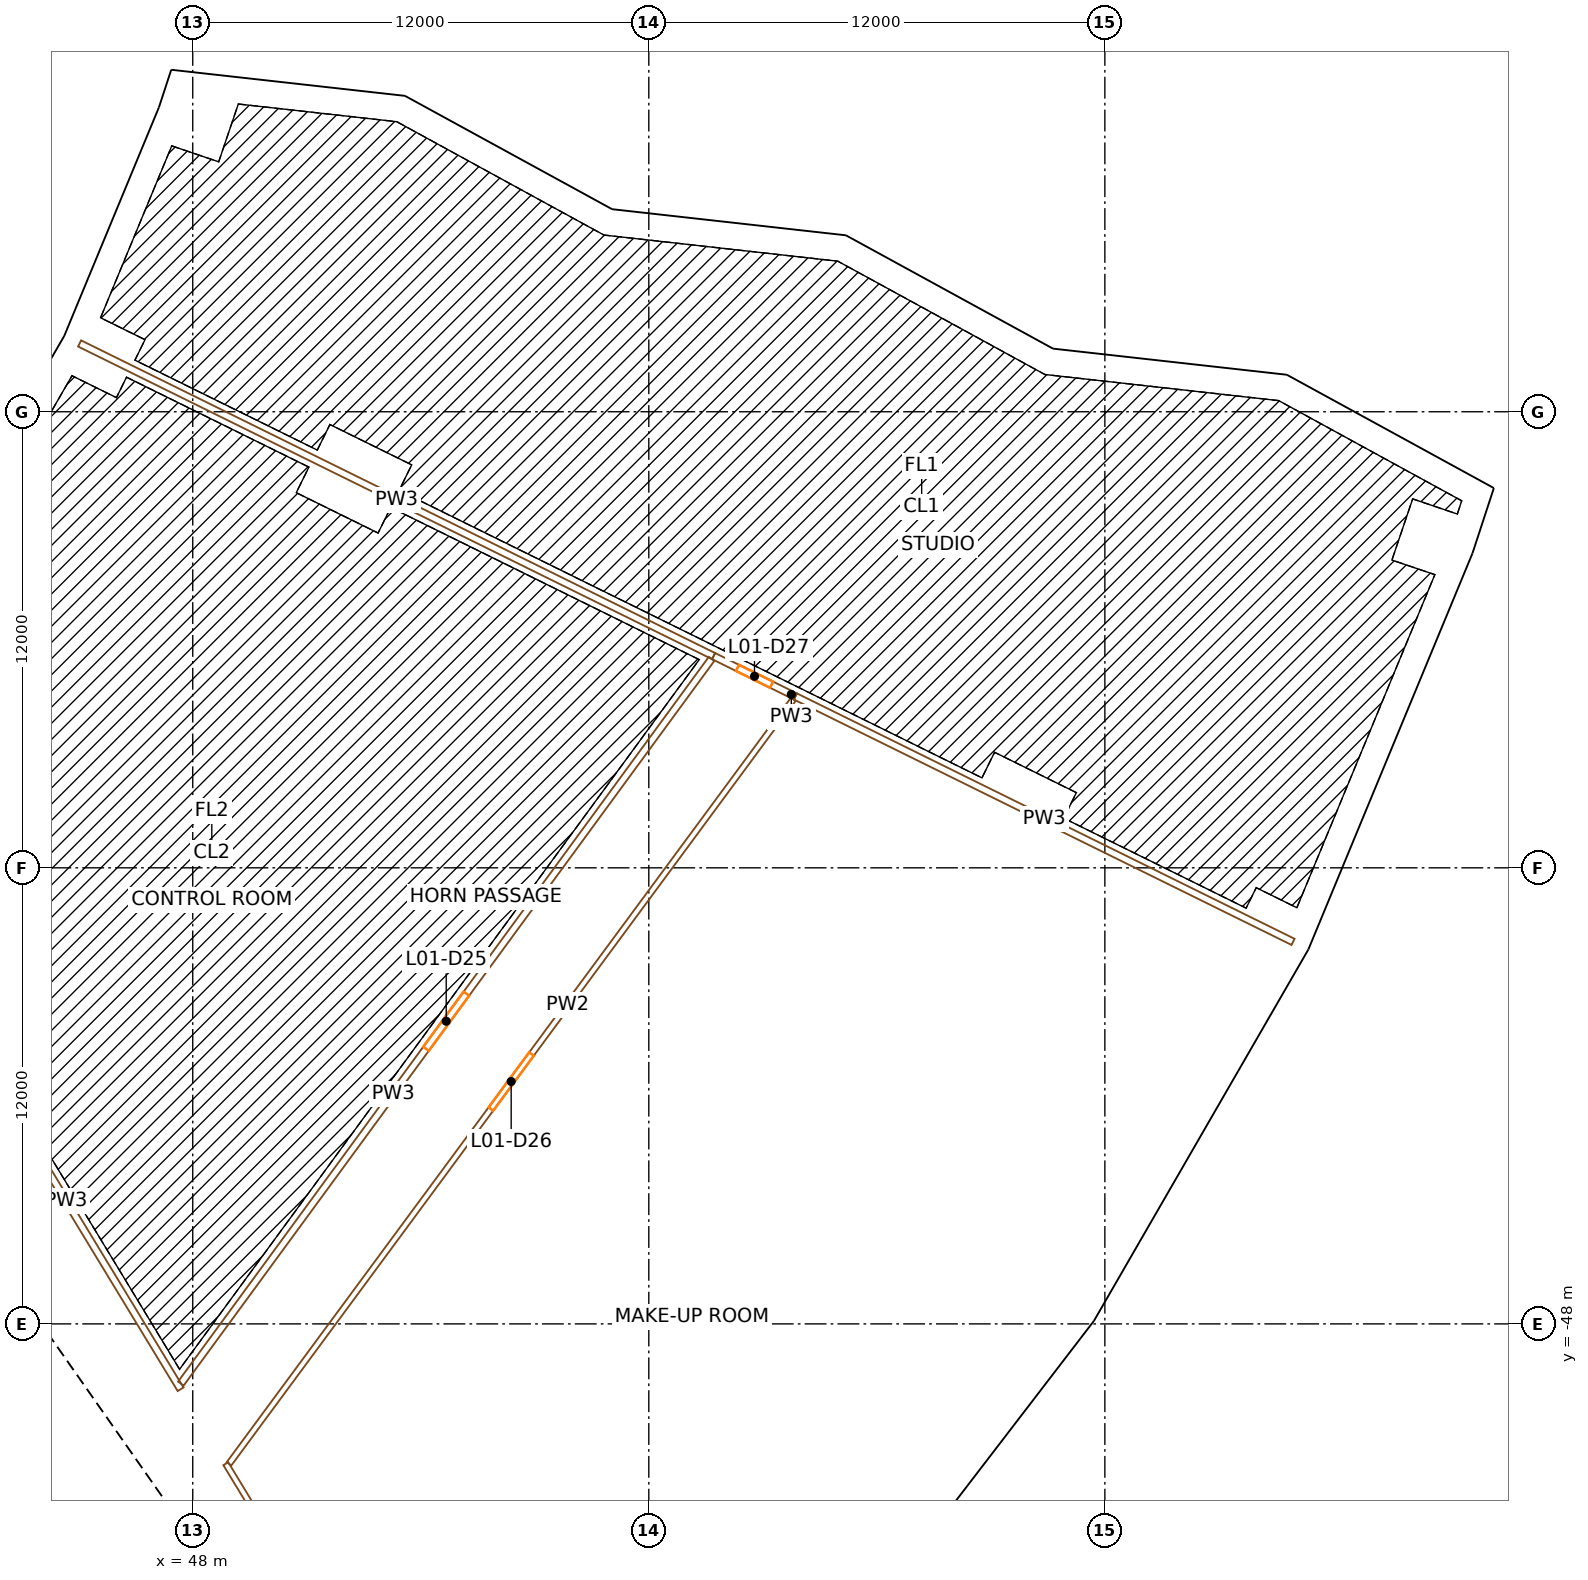
"""IFC4 building model, lengths in metres.
Left out: names, types, materials, properties, quantities, classifications, styles, units other than length and angle.
Written with IfcOpenShell. Run it as: python <this file> out.ifc"""

import sys

from ifc_helpers import new_model, si_unit, direction, frame, frame_2d, origin, origin_2d, place, context, subcontext, project, spatial, rectangle, extrude, element, fill, save


model = new_model("IFC4")
c1 = context("Model", 3, precision=1e-05, world=origin(), true_north=direction((0.0, 1.0)))
c2 = subcontext(c1, "Body", "Model", "MODEL_VIEW")
j1 = project(units=[si_unit("LENGTHUNIT", "METRE"), si_unit("PLANEANGLEUNIT", "RADIAN")], contexts=[c1])
p1 = place(None, origin())
s1 = spatial("IfcSite", under=j1, at=p1, CompositionType="ELEMENT")
p2 = place(p1, origin())
s2 = spatial("IfcBuilding", under=s1, at=p2, CompositionType="ELEMENT")
p3 = place(p2, frame((0.0, 0.0, 9.0)))
s3 = spatial("IfcBuildingStorey", under=s2, at=p3, CompositionType="ELEMENT", Elevation=9.0)
for number, where, z_axis, x_axis in (
    (1, (43.795, -38.407, 0.0), (0.0, 0.0, 1.0), (0.659, 0.752, 0.0)),
    (2, (58.456, -51.264, 0.0), (0.0, 0.0, 1.0), (0.659, 0.752, 0.0)),
    (3, (48.433, -32.362, 0.0), (0.0, 0.0, 1.0), (0.556, 0.831, 0.0)),
    (4, (64.647, -43.196, 0.0), (0.0, 0.0, 1.0), (0.556, 0.831, 0.0)),
):
    element("IfcColumn", number, at=place(p3, frame(where, z_axis=z_axis, x_axis=x_axis)), inside=s3, PredefinedType="COLUMN", context=c2, shape_type="SweptSolid", body=[
        extrude(rectangle(XDim=1.4, YDim=1.8, at=origin_2d()), origin(), (0.0, 0.0, 1.0), 9.0),
    ])
for number, where, z_axis, x_axis in (
    (5, (70.883, -47.362, 0.0), (0.0, 0.0, 1.0), (0.556, 0.831, 0.0)),
    (6, (45.516, -22.446, 0.0), (0.0, 0.0, 1.0), (0.442, 0.897, 0.0)),
):
    element("IfcColumn", number, at=place(p3, frame(where, z_axis=z_axis, x_axis=x_axis)), inside=s3, PredefinedType="COLUMN", context=c2, shape_type="SweptSolid", body=[
        extrude(rectangle(XDim=1.1, YDim=1.3, at=origin_2d()), origin(), (0.0, 0.0, 1.0), 9.0),
    ])
for number, where, z_axis, x_axis in (
    (7, (52.243, -25.763, 0.0), (0.0, 0.0, 1.0), (0.442, 0.897, 0.0)),
    (8, (69.732, -34.388, 0.0), (0.0, 0.0, 1.0), (0.442, 0.897, 0.0)),
):
    element("IfcColumn", number, at=place(p3, frame(where, z_axis=z_axis, x_axis=x_axis)), inside=s3, PredefinedType="COLUMN", context=c2, shape_type="SweptSolid", body=[
        extrude(rectangle(XDim=1.4, YDim=1.8, at=origin_2d()), origin(), (0.0, 0.0, 1.0), 9.0),
    ])
for number, where, z_axis, x_axis in (
    (9, (76.458, -37.705, 0.0), (0.0, 0.0, 1.0), (0.442, 0.897, 0.0)),
    (10, (48.057, -16.313, 0.0), (0.0, 0.0, 1.0), (0.321, 0.947, 0.0)),
):
    element("IfcColumn", number, at=place(p3, frame(where, z_axis=z_axis, x_axis=x_axis)), inside=s3, PredefinedType="COLUMN", context=c2, shape_type="SweptSolid", body=[
        extrude(rectangle(XDim=1.1, YDim=1.3, at=origin_2d()), origin(), (0.0, 0.0, 1.0), 9.0),
    ])
for number, where, z_axis, x_axis in (
    (11, (55.159, -18.724, 0.0), (0.0, 0.0, 1.0), (0.321, 0.947, 0.0)),
    (12, (73.624, -24.992, 0.0), (0.0, 0.0, 1.0), (0.321, 0.947, 0.0)),
):
    element("IfcColumn", number, at=place(p3, frame(where, z_axis=z_axis, x_axis=x_axis)), inside=s3, PredefinedType="COLUMN", context=c2, shape_type="SweptSolid", body=[
        extrude(rectangle(XDim=1.4, YDim=1.8, at=origin_2d()), origin(), (0.0, 0.0, 1.0), 9.0),
    ])
p4 = place(p3, frame((80.726, -27.403, 0.0), z_axis=(0.0, 0.0, 1.0), x_axis=(0.321439465303, 0.946930129495, 0.0)))
e13 = element("IfcColumn", 13, at=p4, inside=s3, PredefinedType="COLUMN", context=c2, shape_type="SweptSolid", body=[
    extrude(rectangle(XDim=1.1, YDim=1.3, at=origin_2d()), origin(), (0.0, 0.0, 1.0), 9.0),
])
p5 = place(p3, frame((49.779, -57.191, 0.0), z_axis=(0.0, 0.0, 1.0), x_axis=(-0.573577477574, 0.819151315216, 0.0)))
e14 = element("IfcWall", 14, at=p5, inside=s3, PredefinedType="SHEAR", context=c2, shape_type="SweptSolid", body=[
    extrude(rectangle(XDim=14.8, YDim=0.9, at=frame_2d((7.4, 0.0))), origin(), (0.0, 0.0, 1.0), 8.6),
])
p6 = place(p5, frame((6.7, 0.0, 0.0)))
e15 = element("IfcOpeningElement", 15, at=p6, cuts=e14, PredefinedType="OPENING", context=c2, shape_type="SweptSolid", body=[
    extrude(rectangle(XDim=1.4, YDim=2.1, at=frame_2d((0.7, 1.05))), frame((0.0, 0.46, 0.0), z_axis=(0.0, -1.0, 0.0), x_axis=(1.0, 0.0, 0.0)), (0.0, 0.0, 1.0), 0.92),
])
p7 = place(p3, frame((81.734, -25.99, 0.0), z_axis=(0.0, 0.0, 1.0), x_axis=(-0.877209140108, 0.480108450781, 0.0)))
e16 = element("IfcWall", 16, at=p7, inside=s3, PredefinedType="SOLIDWALL", context=c2, shape_type="SweptSolid", body=[
    extrude(rectangle(XDim=5.553, YDim=0.45, at=frame_2d((2.776, 0.0))), origin(), (0.0, 0.0, 1.0), 7.7),
])
p8 = place(p3, frame((76.804, -23.255, 0.0), z_axis=(0.0, 0.0, 1.0), x_axis=(-0.993813805196, 0.111059086081, 0.0)))
e17 = element("IfcWall", 17, at=p8, inside=s3, PredefinedType="SOLIDWALL", context=c2, shape_type="SweptSolid", body=[
    extrude(rectangle(XDim=6.362, YDim=0.45, at=frame_2d((3.181, 0.0))), origin(), (0.0, 0.0, 1.0), 7.7),
])
p9 = place(p3, frame((70.422, -22.479, 0.0), z_axis=(0.0, 0.0, 1.0), x_axis=(-0.877230259454, 0.480069861477, 0.0)))
e18 = element("IfcWall", 18, at=p9, inside=s3, PredefinedType="SOLIDWALL", context=c2, shape_type="SweptSolid", body=[
    extrude(rectangle(XDim=5.884, YDim=0.45, at=frame_2d((2.942, 0.0))), origin(), (0.0, 0.0, 1.0), 7.7),
])
p10 = place(p3, frame((65.202, -19.585, 0.0), z_axis=(0.0, 0.0, 1.0), x_axis=(-0.993818963433, 0.111012917816, 0.0)))
e19 = element("IfcWall", 19, at=p10, inside=s3, PredefinedType="SOLIDWALL", context=c2, shape_type="SweptSolid", body=[
    extrude(rectangle(XDim=6.36, YDim=0.45, at=frame_2d((3.18, 0.0))), origin(), (0.0, 0.0, 1.0), 7.7),
])
p11 = place(p3, frame((58.822, -18.81, 0.0), z_axis=(0.0, 0.0, 1.0), x_axis=(-0.87728135657, 0.479976480064, 0.0)))
e20 = element("IfcWall", 20, at=p11, inside=s3, PredefinedType="SOLIDWALL", context=c2, shape_type="SweptSolid", body=[
    extrude(rectangle(XDim=5.885, YDim=0.45, at=frame_2d((2.943, 0.0))), origin(), (0.0, 0.0, 1.0), 7.7),
])
p12 = place(p3, frame((53.599, -15.916, 0.0), z_axis=(0.0, 0.0, 1.0), x_axis=(-0.993827533543, 0.110936168908, 0.0)))
e21 = element("IfcWall", 21, at=p12, inside=s3, PredefinedType="SOLIDWALL", context=c2, shape_type="SweptSolid", body=[
    extrude(rectangle(XDim=6.265, YDim=0.45, at=frame_2d((3.133, 0.0))), origin(), (0.0, 0.0, 1.0), 7.7),
])
p13 = place(p3, frame((44.792, -22.155, 0.0), z_axis=(0.0, 0.0, 1.0), x_axis=(-0.50000447882, -0.866022817921, 0.0)))
e22 = element("IfcWall", 22, at=p13, inside=s3, PredefinedType="SOLIDWALL", context=c2, shape_type="SweptSolid", body=[
    extrude(rectangle(XDim=6.419, YDim=0.45, at=frame_2d((3.21, 0.0))), origin(), (0.0, 0.0, 1.0), 7.7),
])
p14 = place(p3, frame((47.327, -16.056, 0.0), z_axis=(0.0, 0.0, 1.0), x_axis=(-0.382692796414, -0.92387565374, 0.0)))
e23 = element("IfcWall", 23, at=p14, inside=s3, PredefinedType="SOLIDWALL", context=c2, shape_type="SweptSolid", body=[
    extrude(rectangle(XDim=6.576, YDim=0.45, at=frame_2d((3.288, 0.0))), origin(), (0.0, 0.0, 1.0), 7.7),
])
p15 = place(p3, frame((47.509, -15.497, 0.0), z_axis=(0.0, 0.0, 1.0), x_axis=(-0.311474670585, -0.950254455177, 0.0)))
e24 = element("IfcWall", 24, at=p15, inside=s3, PredefinedType="SOLIDWALL", context=c2, shape_type="SweptSolid", body=[
    extrude(rectangle(XDim=0.571, YDim=0.45, at=frame_2d((0.285, 0.0))), origin(), (0.0, 0.0, 1.0), 7.7),
])
p16 = place(p3, frame((64.713, -56.673, 0.0), z_axis=(0.0, 0.0, 1.0), x_axis=(0.608758773695, 0.793355377778, 0.0)))
e25 = element("IfcWall", 25, at=p16, inside=s3, PredefinedType="SOLIDWALL", context=c2, shape_type="SweptSolid", body=[
    extrude(rectangle(XDim=11.135, YDim=0.45, at=frame_2d((5.567, 0.0))), origin(), (0.0, 0.0, 1.0), 7.7),
])
p17 = place(p3, frame((71.512, -47.819, 0.0), z_axis=(0.0, 0.0, 1.0), x_axis=(0.500001430823, 0.866024577697, 0.0)))
e26 = element("IfcWall", 26, at=p17, inside=s3, PredefinedType="SOLIDWALL", context=c2, shape_type="SweptSolid", body=[
    extrude(rectangle(XDim=11.312, YDim=0.45, at=frame_2d((5.656, 0.0))), origin(), (0.0, 0.0, 1.0), 7.7),
])
p18 = place(p3, frame((77.176, -37.993, 0.0), z_axis=(0.0, 0.0, 1.0), x_axis=(0.382700611107, 0.923872416656, 0.0)))
e27 = element("IfcWall", 27, at=p18, inside=s3, PredefinedType="SOLIDWALL", context=c2, shape_type="SweptSolid", body=[
    extrude(rectangle(XDim=11.168, YDim=0.45, at=frame_2d((5.584, 0.0))), origin(), (0.0, 0.0, 1.0), 7.7),
])
p19 = place(p3, frame((81.457, -27.66, 0.0), z_axis=(0.0, 0.0, 1.0), x_axis=(0.311621150825, 0.95020642934, 0.0)))
e28 = element("IfcWall", 28, at=p19, inside=s3, PredefinedType="SOLIDWALL", context=c2, shape_type="SweptSolid", body=[
    extrude(rectangle(XDim=1.846, YDim=0.45, at=frame_2d((0.923, 0.0))), origin(), (0.0, 0.0, 1.0), 7.7),
])
p20 = place(p3, frame((41.648, -39.789, 0.0), z_axis=(0.0, 0.0, 1.0), x_axis=(0.519150836569, -0.854682636357, 0.0)))
e29 = element("IfcWall", 29, at=p20, inside=s3, PredefinedType="PARTITIONING", context=c2, shape_type="SweptSolid", body=[
    extrude(rectangle(XDim=11.619, YDim=0.18, at=frame_2d((5.81, 0.0))), origin(), (0.0, 0.0, 1.0), 7.6),
])
p21 = place(p3, frame((47.687, -49.571, 0.0), z_axis=(0.0, 0.0, 1.0), x_axis=(0.590834674168, 0.806792654776, 0.0)))
e30 = element("IfcWall", 30, at=p21, inside=s3, PredefinedType="PARTITIONING", context=c2, shape_type="SweptSolid", body=[
    extrude(rectangle(XDim=23.635, YDim=0.18, at=frame_2d((11.818, 0.0))), origin(), (0.0, 0.0, 1.0), 7.6),
])
p22 = place(p21, frame((10.918, 0.0, 0.0)))
e31 = element("IfcOpeningElement", 31, at=p22, cuts=e30, PredefinedType="OPENING", context=c2, shape_type="SweptSolid", body=[
    extrude(rectangle(XDim=1.8, YDim=2.1, at=frame_2d((0.9, 1.05))), frame((0.0, 0.1, 0.0), z_axis=(0.0, -1.0, 0.0), x_axis=(1.0, 0.0, 0.0)), (0.0, 0.0, 1.0), 0.2),
])
p23 = place(p3, frame((48.87, -51.679, 0.0), z_axis=(0.0, 0.0, 1.0), x_axis=(0.519169312849, -0.854671413232, 0.0)))
e32 = element("IfcWall", 32, at=p23, inside=s3, PredefinedType="PARTITIONING", context=c2, shape_type="SweptSolid", body=[
    extrude(rectangle(XDim=7.831, YDim=0.15, at=frame_2d((3.915, 0.0))), origin(), (0.0, 0.0, 1.0), 7.6),
])
p24 = place(p3, frame((63.804, -31.563, 0.0), z_axis=(0.0, 0.0, 1.0), x_axis=(-0.593865237906, -0.804564527683, 0.0)))
e33 = element("IfcWall", 33, at=p24, inside=s3, PredefinedType="PARTITIONING", context=c2, shape_type="SweptSolid", body=[
    extrude(rectangle(XDim=25.006, YDim=0.15, at=frame_2d((12.503, 0.0))), origin(), (0.0, 0.0, 1.0), 7.6),
])
p25 = place(p24, frame((11.603, 0.0, 0.0)))
e34 = element("IfcOpeningElement", 34, at=p25, cuts=e33, PredefinedType="OPENING", context=c2, shape_type="SweptSolid", body=[
    extrude(rectangle(XDim=1.8, YDim=2.1, at=frame_2d((0.9, 1.05))), frame((0.0, 0.085, 0.0), z_axis=(0.0, -1.0, 0.0), x_axis=(1.0, 0.0, 0.0)), (0.0, 0.0, 1.0), 0.17),
])
p26 = place(p3, frame((61.705, -30.429, 0.0), z_axis=(0.0, 0.0, 1.0), x_axis=(-0.896873438268, 0.442287277377, 0.0)))
e35 = element("IfcWall", 35, at=p26, inside=s3, PredefinedType="PARTITIONING", context=c2, shape_type="SweptSolid", body=[
    extrude(rectangle(XDim=18.6, YDim=0.18, at=frame_2d((9.3, 0.0))), origin(), (0.0, 0.0, 1.0), 7.6),
])
p27 = place(p3, frame((61.705, -30.429, 0.0), z_axis=(0.0, 0.0, 1.0), x_axis=(0.896875292523, -0.442283517284, 0.0)))
e36 = element("IfcWall", 36, at=p27, inside=s3, PredefinedType="PARTITIONING", context=c2, shape_type="SweptSolid", body=[
    extrude(rectangle(XDim=2.4, YDim=0.18, at=frame_2d((1.2, 0.0))), origin(), (0.0, 0.0, 1.0), 7.6),
])
p28 = place(p27, frame((0.7, 0.0, 0.0)))
e37 = element("IfcOpeningElement", 37, at=p28, cuts=e36, PredefinedType="OPENING", context=c2, shape_type="SweptSolid", body=[
    extrude(rectangle(XDim=1.0, YDim=2.1, at=frame_2d((0.5, 1.05))), frame((0.0, 0.1, 0.0), z_axis=(0.0, -1.0, 0.0), x_axis=(1.0, 0.0, 0.0)), (0.0, 0.0, 1.0), 0.2),
])
p29 = place(p3, frame((76.952, -37.948, 0.0), z_axis=(0.0, 0.0, 1.0), x_axis=(-0.896868508028, 0.442297274813, 0.0)))
e38 = element("IfcWall", 38, at=p29, inside=s3, PredefinedType="PARTITIONING", context=c2, shape_type="SweptSolid", body=[
    extrude(rectangle(XDim=14.6, YDim=0.18, at=frame_2d((7.3, 0.0))), origin(), (0.0, 0.0, 1.0), 7.6),
])
p30 = place(p6, origin())
e39 = element("IfcDoor", 39, at=p30, inside=s3, OperationType="DOUBLE_DOOR_SINGLE_SWING", PredefinedType="DOOR", context=c2, shape_type="SweptSolid", body=[
    extrude(rectangle(XDim=1.4, YDim=2.1, at=frame_2d((0.7, 1.05))), frame((0.0, 0.025, 0.0), z_axis=(0.0, -1.0, 0.0), x_axis=(1.0, 0.0, 0.0)), (0.0, 0.0, 1.0), 0.05),
])
fill(e15, e39)
p31 = place(p22, origin())
e40 = element("IfcDoor", 40, at=p31, inside=s3, OperationType="DOUBLE_DOOR_SINGLE_SWING", PredefinedType="DOOR", context=c2, shape_type="SweptSolid", body=[
    extrude(rectangle(XDim=1.8, YDim=2.1, at=frame_2d((0.9, 1.05))), frame((0.0, 0.025, 0.0), z_axis=(0.0, -1.0, 0.0), x_axis=(1.0, 0.0, 0.0)), (0.0, 0.0, 1.0), 0.05),
])
fill(e31, e40)
p32 = place(p25, origin())
e41 = element("IfcDoor", 41, at=p32, inside=s3, OperationType="DOUBLE_DOOR_SINGLE_SWING", PredefinedType="DOOR", context=c2, shape_type="SweptSolid", body=[
    extrude(rectangle(XDim=1.8, YDim=2.1, at=frame_2d((0.9, 1.05))), frame((0.0, 0.025, 0.0), z_axis=(0.0, -1.0, 0.0), x_axis=(1.0, 0.0, 0.0)), (0.0, 0.0, 1.0), 0.05),
])
fill(e34, e41)
p33 = place(p28, origin())
e42 = element("IfcDoor", 42, at=p33, inside=s3, OperationType="SINGLE_SWING_RIGHT", PredefinedType="DOOR", context=c2, shape_type="SweptSolid", body=[
    extrude(rectangle(XDim=1.0, YDim=2.1, at=frame_2d((0.5, 1.05))), frame((0.0, 0.025, 0.0), z_axis=(0.0, -1.0, 0.0), x_axis=(1.0, 0.0, 0.0)), (0.0, 0.0, 1.0), 0.05),
])
fill(e37, e42)
save(model, sys.argv[1])
